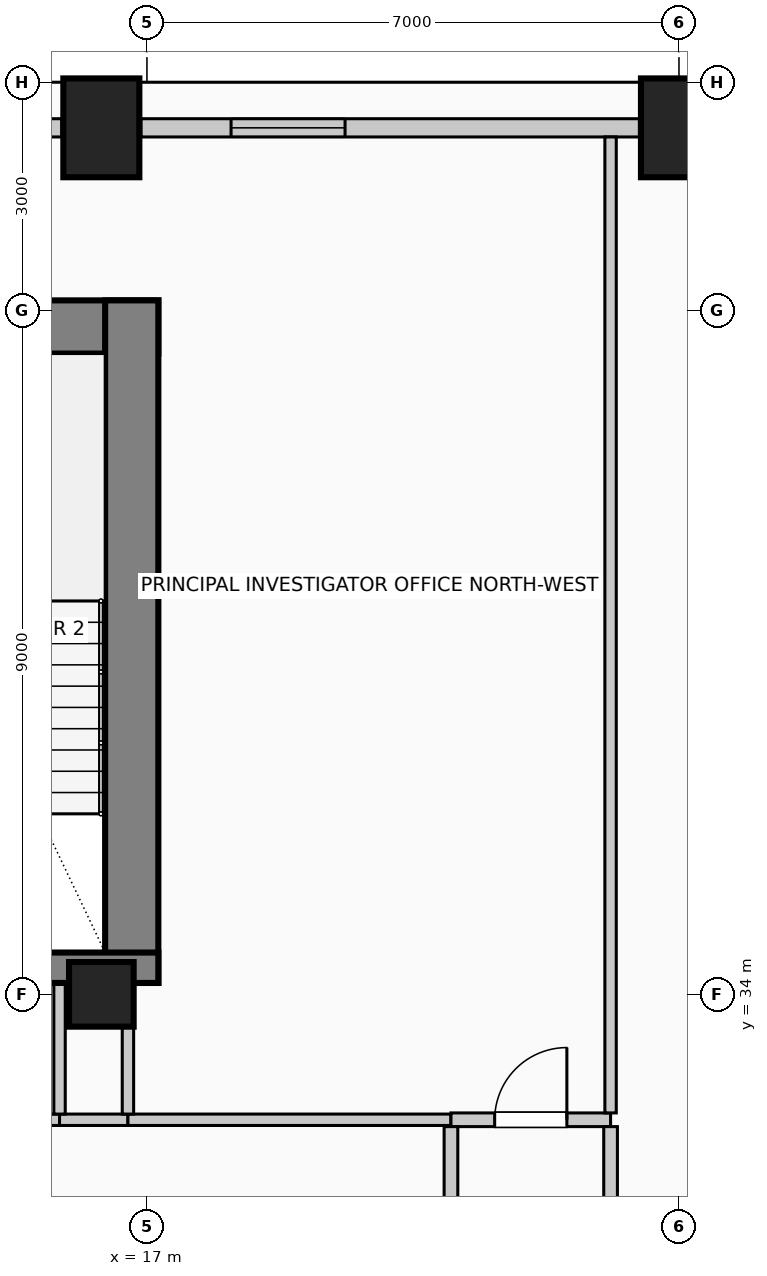
"""IFC4 building model, lengths in metres.
Left out: names, types, materials, properties, quantities, classifications, styles, units other than length and angle.
Written with IfcOpenShell. Run it as: python <this file> out.ifc"""

import sys

from ifc_helpers import new_model, si_unit, direction, frame, frame_2d, origin, origin_2d, place, context, subcontext, project, spatial, rectangle, circle, extrude, element, fill, save


model = new_model("IFC4")
c1 = context("Model", 3, precision=1e-05, world=origin(), true_north=direction((0.0, 1.0)))
c2 = subcontext(c1, "Body", "Model", "MODEL_VIEW")
j1 = project(units=[si_unit("LENGTHUNIT", "METRE"), si_unit("PLANEANGLEUNIT", "RADIAN")], contexts=[c1])
p1 = place(None, origin())
s1 = spatial("IfcSite", under=j1, at=p1, CompositionType="ELEMENT")
p2 = place(p1, origin())
s2 = spatial("IfcBuilding", under=s1, at=p2, CompositionType="ELEMENT")
p3 = place(p2, frame((0.0, 0.0, 226.6)))
s3 = spatial("IfcBuildingStorey", under=s2, at=p3, CompositionType="ELEMENT", Elevation=226.6)
p4 = place(p3, frame((2.85, 42.78, 0.0), z_axis=(0.0, 0.0, 1.0), x_axis=(1.0, 0.0, 0.0)))
e1 = element("IfcWall", 1, at=p4, inside=s3, PredefinedType="SHEAR", context=c2, shape_type="SweptSolid", body=[
    extrude(rectangle(XDim=14.3, YDim=0.7, at=frame_2d((7.15, 0.0))), origin(), (0.0, 0.0, 1.0), 4.0),
])
p5 = place(p3, frame((16.8, 34.15, 0.0), z_axis=(0.0, 0.0, 1.0), x_axis=(0.0, 1.0, 0.0)))
e2 = element("IfcWall", 2, at=p5, inside=s3, PredefinedType="SHEAR", context=c2, shape_type="SweptSolid", body=[
    extrude(rectangle(XDim=8.98, YDim=0.7, at=frame_2d((4.49, 0.0))), origin(), (0.0, 0.0, 1.0), 4.0),
])
p6 = place(p3, frame((12.29, 34.35, 0.0), z_axis=(0.0, 0.0, 1.0), x_axis=(1.0, 0.0, 0.0)))
e3 = element("IfcWall", 3, at=p6, inside=s3, PredefinedType="SHEAR", context=c2, shape_type="SweptSolid", body=[
    extrude(rectangle(XDim=4.86, YDim=0.4, at=frame_2d((2.43, 0.0))), origin(), (0.0, 0.0, 1.0), 4.0),
])
p7 = place(p6, frame((1.4, 0.0, 0.0)))
e4 = element("IfcOpeningElement", 4, at=p7, cuts=e3, PredefinedType="OPENING", context=c2, shape_type="SweptSolid", body=[
    extrude(rectangle(XDim=1.15, YDim=2.2, at=frame_2d((0.575, 1.1))), frame((0.0, 0.21, 0.0), z_axis=(0.0, -1.0, 0.0), x_axis=(1.0, 0.0, 0.0)), (0.0, 0.0, 1.0), 0.42),
])
for number, where, z_axis, x_axis in (
    (5, (16.4, 45.4, 0.0), (0.0, 0.0, 1.0), (1.0, 0.0, 0.0)),
    (6, (24.0, 45.4, 0.0), (0.0, 0.0, 1.0), (1.0, 0.0, 0.0)),
):
    element("IfcColumn", number, at=place(p3, frame(where, z_axis=z_axis, x_axis=x_axis)), inside=s3, PredefinedType="COLUMN", context=c2, shape_type="SweptSolid", body=[
        extrude(rectangle(XDim=1.0, YDim=1.3, at=origin_2d()), origin(), (0.0, 0.0, 1.0), 4.0),
    ])
p8 = place(p3, frame((16.4, 34.0, 0.0), z_axis=(0.0, 0.0, 1.0), x_axis=(1.0, 0.0, 0.0)))
e7 = element("IfcColumn", 7, at=p8, inside=s3, PredefinedType="COLUMN", context=c2, shape_type="SweptSolid", body=[
    extrude(circle(Radius=0.425, at=origin_2d()), origin(), (0.0, 0.0, 1.0), 4.0),
])
p9 = place(p3, frame((14.395, 45.4, 0.0), z_axis=(0.0, 0.0, 1.0), x_axis=(1.0, 0.0, 0.0)))
e8 = element("IfcWall", 8, at=p9, inside=s3, PredefinedType="SOLIDWALL", context=c2, shape_type="SweptSolid", body=[
    extrude(rectangle(XDim=1.485, YDim=0.24, at=frame_2d((0.742, 0.0))), origin(), (0.0, 0.0, 1.0), 3.0),
])
p10 = place(p3, frame((16.92, 45.4, 0.0), z_axis=(0.0, 0.0, 1.0), x_axis=(1.0, 0.0, 0.0)))
e9 = element("IfcWall", 9, at=p10, inside=s3, PredefinedType="SOLIDWALL", context=c2, shape_type="SweptSolid", body=[
    extrude(rectangle(XDim=6.56, YDim=0.24, at=frame_2d((3.28, 0.0))), origin(), (0.0, 0.0, 1.0), 3.0),
])
p11 = place(p10, frame((1.187, 0.0, 0.42)))
e10 = element("IfcOpeningElement", 10, at=p11, cuts=e9, PredefinedType="OPENING", context=c2, shape_type="SweptSolid", body=[
    extrude(rectangle(XDim=1.5, YDim=2.2, at=frame_2d((0.75, 1.1))), frame((0.0, 0.13, 0.0), z_axis=(0.0, -1.0, 0.0), x_axis=(1.0, 0.0, 0.0)), (0.0, 0.0, 1.0), 0.26),
])
p12 = place(p3, frame((12.33, 32.35, 0.0), z_axis=(0.0, 0.0, 1.0), x_axis=(1.0, 0.0, 0.0)))
e11 = element("IfcWall", 11, at=p12, inside=s3, PredefinedType="PARTITIONING", context=c2, shape_type="SweptSolid", body=[
    extrude(rectangle(XDim=3.52, YDim=0.15, at=frame_2d((1.76, 0.0))), origin(), (0.0, 0.0, 1.0), 3.75),
])
p13 = place(p12, frame((1.235, 0.0, 0.0)))
e12 = element("IfcOpeningElement", 12, at=p13, cuts=e11, PredefinedType="OPENING", context=c2, shape_type="SweptSolid", body=[
    extrude(rectangle(XDim=1.05, YDim=2.15, at=frame_2d((0.525, 1.075))), frame((0.0, 0.085, 0.0), z_axis=(0.0, -1.0, 0.0), x_axis=(1.0, 0.0, 0.0)), (0.0, 0.0, 1.0), 0.17),
])
p14 = place(p3, frame((15.85, 32.35, 0.0), z_axis=(0.0, 0.0, 1.0), x_axis=(1.0, 0.0, 0.0)))
e13 = element("IfcWall", 13, at=p14, inside=s3, PredefinedType="PARTITIONING", context=c2, shape_type="SweptSolid", body=[
    extrude(rectangle(XDim=0.9, YDim=0.15, at=frame_2d((0.45, 0.0))), origin(), (0.0, 0.0, 1.0), 3.75),
])
p15 = place(p3, frame((16.75, 32.35, 0.0), z_axis=(0.0, 0.0, 1.0), x_axis=(1.0, 0.0, 0.0)))
e14 = element("IfcWall", 14, at=p15, inside=s3, PredefinedType="PARTITIONING", context=c2, shape_type="SweptSolid", body=[
    extrude(rectangle(XDim=4.25, YDim=0.15, at=frame_2d((2.125, 0.0))), origin(), (0.0, 0.0, 1.0), 3.75),
])
p16 = place(p3, frame((21.0, 32.35, 0.0), z_axis=(0.0, 0.0, 1.0), x_axis=(1.0, 0.0, 0.0)))
e15 = element("IfcWall", 15, at=p16, inside=s3, PredefinedType="PARTITIONING", context=c2, shape_type="SweptSolid", body=[
    extrude(rectangle(XDim=2.1, YDim=0.18, at=frame_2d((1.05, 0.0))), origin(), (0.0, 0.0, 1.0), 3.75),
])
p17 = place(p16, frame((0.575, 0.0, 0.0)))
e16 = element("IfcOpeningElement", 16, at=p17, cuts=e15, PredefinedType="OPENING", context=c2, shape_type="SweptSolid", body=[
    extrude(rectangle(XDim=0.95, YDim=2.15, at=frame_2d((0.475, 1.075))), frame((0.0, 0.1, 0.0), z_axis=(0.0, -1.0, 0.0), x_axis=(1.0, 0.0, 0.0)), (0.0, 0.0, 1.0), 0.2),
])
p18 = place(p3, frame((15.85, 32.425, 0.0), z_axis=(0.0, 0.0, 1.0), x_axis=(0.0, 1.0, 0.0)))
e17 = element("IfcWall", 17, at=p18, inside=s3, PredefinedType="PARTITIONING", context=c2, shape_type="SweptSolid", body=[
    extrude(rectangle(XDim=1.725, YDim=0.15, at=frame_2d((0.862, 0.0))), origin(), (0.0, 0.0, 1.0), 3.75),
])
p19 = place(p3, frame((16.75, 32.425, 0.0), z_axis=(0.0, 0.0, 1.0), x_axis=(0.0, 1.0, 0.0)))
e18 = element("IfcWall", 18, at=p19, inside=s3, PredefinedType="PARTITIONING", context=c2, shape_type="SweptSolid", body=[
    extrude(rectangle(XDim=1.15, YDim=0.15, at=frame_2d((0.575, 0.0))), origin(), (0.0, 0.0, 1.0), 3.75),
])
p20 = place(p3, frame((21.0, 26.925, 0.0), z_axis=(0.0, 0.0, 1.0), x_axis=(0.0, 1.0, 0.0)))
e19 = element("IfcWall", 19, at=p20, inside=s3, PredefinedType="PARTITIONING", context=c2, shape_type="SweptSolid", body=[
    extrude(rectangle(XDim=5.335, YDim=0.18, at=frame_2d((2.667, 0.0))), origin(), (0.0, 0.0, 1.0), 3.75),
])
p21 = place(p3, frame((23.1, 29.14, 0.0), z_axis=(0.0, 0.0, 1.0), x_axis=(0.0, 1.0, 0.0)))
e20 = element("IfcWall", 20, at=p21, inside=s3, PredefinedType="PARTITIONING", context=c2, shape_type="SweptSolid", body=[
    extrude(rectangle(XDim=3.12, YDim=0.18, at=frame_2d((1.56, 0.0))), origin(), (0.0, 0.0, 1.0), 3.75),
])
p22 = place(p3, frame((23.1, 32.44, 0.0), z_axis=(0.0, 0.0, 1.0), x_axis=(0.0, 1.0, 0.0)))
e21 = element("IfcWall", 21, at=p22, inside=s3, PredefinedType="PARTITIONING", context=c2, shape_type="SweptSolid", body=[
    extrude(rectangle(XDim=12.84, YDim=0.15, at=frame_2d((6.42, 0.0))), origin(), (0.0, 0.0, 1.0), 3.75),
])
p23 = place(p11, origin())
e22 = element("IfcWindow", 22, at=p23, inside=s3, PartitioningType="SINGLE_PANEL", PredefinedType="WINDOW", context=c2, shape_type="SweptSolid", body=[
    extrude(rectangle(XDim=1.5, YDim=2.2, at=frame_2d((0.75, 1.1))), frame((0.0, 0.03, 0.0), z_axis=(0.0, -1.0, 0.0), x_axis=(1.0, 0.0, 0.0)), (0.0, 0.0, 1.0), 0.06),
])
fill(e10, e22)
p24 = place(p17, origin())
e23 = element("IfcDoor", 23, at=p24, inside=s3, OperationType="SINGLE_SWING_RIGHT", PredefinedType="DOOR", context=c2, shape_type="SweptSolid", body=[
    extrude(rectangle(XDim=0.95, YDim=2.15, at=frame_2d((0.475, 1.075))), frame((0.0, 0.025, 0.0), z_axis=(0.0, -1.0, 0.0), x_axis=(1.0, 0.0, 0.0)), (0.0, 0.0, 1.0), 0.05),
])
fill(e16, e23)
save(model, sys.argv[1])
